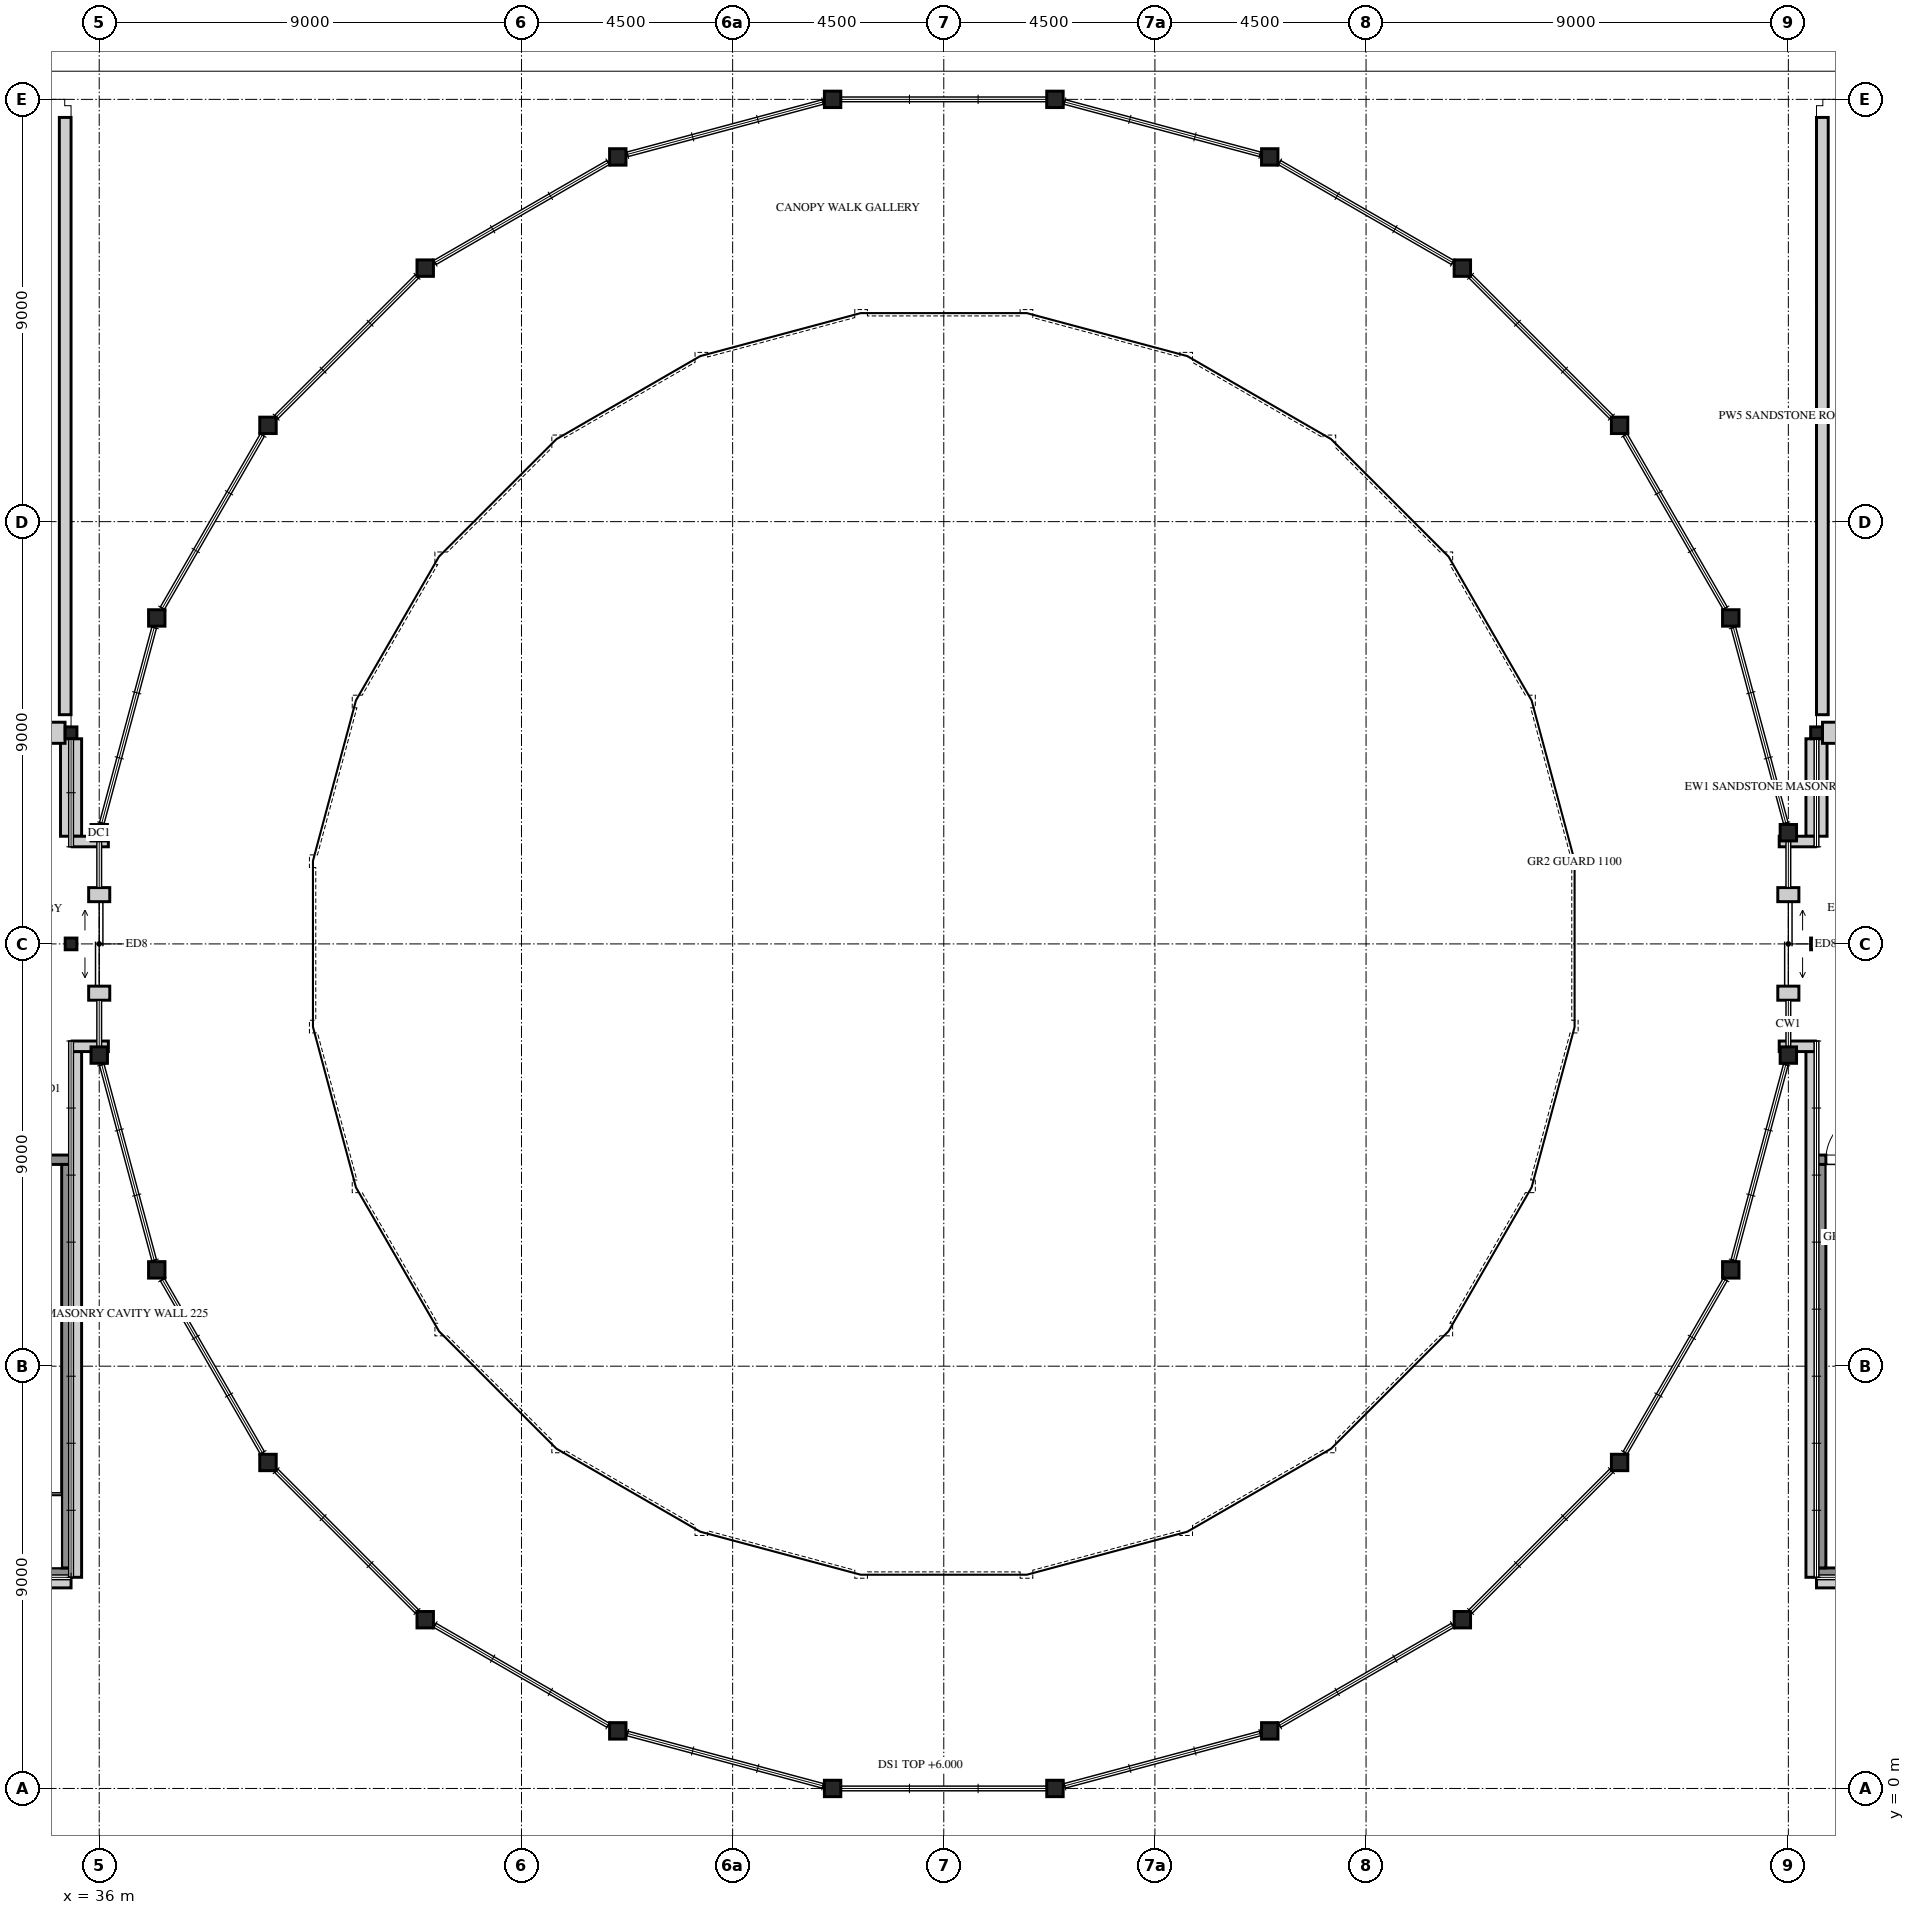
"""IFC4 building model, lengths in metres.
Left out: names, types, materials, properties, quantities, classifications, styles, units other than length and angle.
Written with IfcOpenShell. Run it as: python <this file> out.ifc"""

import sys

from ifc_helpers import new_model, si_unit, direction, frame, frame_2d, origin, origin_2d, place, context, subcontext, project, spatial, rectangle, hollow_rectangle, extrude, element, fill, save


model = new_model("IFC4")
c1 = context("Model", 3, precision=1e-05, world=origin(), true_north=direction((0.0, 1.0)))
c2 = subcontext(c1, "Body", "Model", "MODEL_VIEW")
j1 = project(units=[si_unit("LENGTHUNIT", "METRE"), si_unit("PLANEANGLEUNIT", "RADIAN")], contexts=[c1])
p1 = place(None, origin())
s1 = spatial("IfcSite", under=j1, at=p1, CompositionType="ELEMENT")
p2 = place(p1, origin())
s2 = spatial("IfcBuilding", under=s1, at=p2, CompositionType="ELEMENT")
p3 = place(p2, frame((0.0, 0.0, 6.0)))
s3 = spatial("IfcBuildingStorey", under=s2, at=p3, CompositionType="ELEMENT", Elevation=6.0)
for number, where, z_axis, x_axis in (
    (1, (72.0, 20.37, 0.0), (0.0, 0.0, 1.0), (1.0, 0.0, 0.0)),
    (2, (70.773, 24.948, 0.0), (0.0, 0.0, 1.0), (1.0, 0.0, 0.0)),
    (3, (68.404, 29.052, 0.0), (0.0, 0.0, 1.0), (1.0, 0.0, 0.0)),
    (4, (65.052, 32.404, 0.0), (0.0, 0.0, 1.0), (1.0, 0.0, 0.0)),
    (5, (60.948, 34.773, 0.0), (0.0, 0.0, 1.0), (1.0, 0.0, 0.0)),
    (6, (56.37, 36.0, 0.0), (0.0, 0.0, 1.0), (1.0, 0.0, 0.0)),
    (7, (51.63, 36.0, 0.0), (0.0, 0.0, 1.0), (1.0, 0.0, 0.0)),
    (8, (47.052, 34.773, 0.0), (0.0, 0.0, 1.0), (1.0, 0.0, 0.0)),
    (9, (42.948, 32.404, 0.0), (0.0, 0.0, 1.0), (1.0, 0.0, 0.0)),
    (10, (39.596, 29.052, 0.0), (0.0, 0.0, 1.0), (1.0, 0.0, 0.0)),
    (11, (37.227, 24.948, 0.0), (0.0, 0.0, 1.0), (1.0, 0.0, 0.0)),
    (12, (36.0, 20.37, 0.0), (0.0, 0.0, 1.0), (1.0, 0.0, 0.0)),
    (13, (36.0, 15.63, 0.0), (0.0, 0.0, 1.0), (1.0, 0.0, 0.0)),
    (14, (37.227, 11.052, 0.0), (0.0, 0.0, 1.0), (1.0, 0.0, 0.0)),
    (15, (39.596, 6.948, 0.0), (0.0, 0.0, 1.0), (1.0, 0.0, 0.0)),
    (16, (42.948, 3.596, 0.0), (0.0, 0.0, 1.0), (1.0, 0.0, 0.0)),
    (17, (47.052, 1.227, 0.0), (0.0, 0.0, 1.0), (1.0, 0.0, 0.0)),
    (18, (51.63, 0.0, 0.0), (0.0, 0.0, 1.0), (1.0, 0.0, 0.0)),
    (19, (56.37, 0.0, 0.0), (0.0, 0.0, 1.0), (1.0, 0.0, 0.0)),
    (20, (60.948, 1.227, 0.0), (0.0, 0.0, 1.0), (1.0, 0.0, 0.0)),
    (21, (65.052, 3.596, 0.0), (0.0, 0.0, 1.0), (1.0, 0.0, 0.0)),
    (22, (68.404, 6.948, 0.0), (0.0, 0.0, 1.0), (1.0, 0.0, 0.0)),
    (23, (70.773, 11.052, 0.0), (0.0, 0.0, 1.0), (1.0, 0.0, 0.0)),
    (24, (72.0, 15.63, 0.0), (0.0, 0.0, 1.0), (1.0, 0.0, 0.0)),
):
    element("IfcColumn", number, at=place(p3, frame(where, z_axis=z_axis, x_axis=x_axis)), inside=s3, PredefinedType="COLUMN", context=c2, shape_type="SweptSolid", body=[
        extrude(hollow_rectangle(XDim=0.35, YDim=0.35, WallThickness=0.012, InnerFilletRadius=0.019, OuterFilletRadius=0.031, at=origin_2d()), origin(), (0.0, 0.0, 1.0), 4.3),
    ])
for number, where, z_axis, x_axis in (
    (25, (31.5, 4.6, 0.0), (0.0, 0.0, 1.0), (1.0, 0.0, 0.0)),
    (26, (31.5, 13.4, 0.0), (0.0, 0.0, 1.0), (1.0, 0.0, 0.0)),
):
    element("IfcWall", number, at=place(p3, frame(where, z_axis=z_axis, x_axis=x_axis)), inside=s3, PredefinedType="SHEAR", context=c2, shape_type="SweptSolid", body=[
        extrude(rectangle(XDim=3.9, YDim=0.2, at=frame_2d((1.95, 0.0))), origin(), (0.0, 0.0, 1.0), 4.5),
    ])
p4 = place(p3, frame((35.3, 4.7, 0.0), z_axis=(0.0, 0.0, 1.0), x_axis=(0.0, 1.0, 0.0)))
e27 = element("IfcWall", 27, at=p4, inside=s3, PredefinedType="SHEAR", context=c2, shape_type="SweptSolid", body=[
    extrude(rectangle(XDim=8.6, YDim=0.2, at=frame_2d((4.3, 0.0))), origin(), (0.0, 0.0, 1.0), 4.5),
])
for number, where, z_axis, x_axis in (
    (28, (35.4, 18.0, 0.0), (0.0, 0.0, 1.0), (1.0, 0.0, 0.0)),
    (29, (35.4, 22.5, 0.0), (0.0, 0.0, 1.0), (1.0, 0.0, 0.0)),
):
    element("IfcColumn", number, at=place(p3, frame(where, z_axis=z_axis, x_axis=x_axis)), inside=s3, PredefinedType="COLUMN", context=c2, shape_type="SweptSolid", body=[
        extrude(hollow_rectangle(XDim=0.25, YDim=0.25, WallThickness=0.009, InnerFilletRadius=0.013, OuterFilletRadius=0.022, at=origin_2d()), origin(), (0.0, 0.0, 1.0), 4.046),
    ])
p5 = place(p3, frame((72.6, 4.6, 0.0), z_axis=(0.0, 0.0, 1.0), x_axis=(1.0, 0.0, 0.0)))
e30 = element("IfcWall", 30, at=p5, inside=s3, PredefinedType="SHEAR", context=c2, shape_type="SweptSolid", body=[
    extrude(rectangle(XDim=3.9, YDim=0.2, at=frame_2d((1.95, 0.0))), origin(), (0.0, 0.0, 1.0), 4.5),
])
p6 = place(p3, frame((72.6, 13.4, 0.0), z_axis=(0.0, 0.0, 1.0), x_axis=(1.0, 0.0, 0.0)))
e31 = element("IfcWall", 31, at=p6, inside=s3, PredefinedType="SHEAR", context=c2, shape_type="SweptSolid", body=[
    extrude(rectangle(XDim=3.9, YDim=0.2, at=frame_2d((1.95, 0.0))), origin(), (0.0, 0.0, 1.0), 4.5),
])
p7 = place(p6, frame((0.2, 0.0, 0.0)))
e32 = element("IfcOpeningElement", 32, at=p7, cuts=e31, PredefinedType="OPENING", context=c2, shape_type="SweptSolid", body=[
    extrude(rectangle(XDim=1.0, YDim=2.1, at=frame_2d((0.5, 1.05))), frame((0.0, 0.11, 0.0), z_axis=(0.0, -1.0, 0.0), x_axis=(1.0, 0.0, 0.0)), (0.0, 0.0, 1.0), 0.22),
])
p8 = place(p3, frame((72.7, 4.7, 0.0), z_axis=(0.0, 0.0, 1.0), x_axis=(0.0, 1.0, 0.0)))
e33 = element("IfcWall", 33, at=p8, inside=s3, PredefinedType="SHEAR", context=c2, shape_type="SweptSolid", body=[
    extrude(rectangle(XDim=8.6, YDim=0.2, at=frame_2d((4.3, 0.0))), origin(), (0.0, 0.0, 1.0), 4.5),
])
for number, where, z_axis, x_axis in (
    (34, (72.6, 18.0, 0.0), (0.0, 0.0, 1.0), (1.0, 0.0, 0.0)),
    (35, (72.6, 22.5, 0.0), (0.0, 0.0, 1.0), (1.0, 0.0, 0.0)),
):
    element("IfcColumn", number, at=place(p3, frame(where, z_axis=z_axis, x_axis=x_axis)), inside=s3, PredefinedType="COLUMN", context=c2, shape_type="SweptSolid", body=[
        extrude(hollow_rectangle(XDim=0.25, YDim=0.25, WallThickness=0.009, InnerFilletRadius=0.013, OuterFilletRadius=0.022, at=origin_2d()), origin(), (0.0, 0.0, 1.0), 4.046),
    ])
p9 = place(p3, frame((36.0, 16.8, 0.0), z_axis=(0.0, 0.0, 1.0), x_axis=(0.0, 1.0, 0.0)))
e36 = element("IfcWall", 36, at=p9, inside=s3, PredefinedType="STANDARD", context=c2, shape_type="SweptSolid", body=[
    extrude(rectangle(XDim=2.4, YDim=0.45, at=frame_2d((1.2, 0.0))), origin(), (0.0, 0.0, 1.0), 3.75),
])
p10 = place(p9, frame((0.3, 0.0, 0.012)))
e37 = element("IfcOpeningElement", 37, at=p10, cuts=e36, PredefinedType="OPENING", context=c2, shape_type="SweptSolid", body=[
    extrude(rectangle(XDim=1.8, YDim=2.4, at=frame_2d((0.9, 1.2))), frame((0.0, 0.235, 0.0), z_axis=(0.0, -1.0, 0.0), x_axis=(1.0, 0.0, 0.0)), (0.0, 0.0, 1.0), 0.47),
])
p11 = place(p3, frame((72.0, 19.2, 0.0), z_axis=(0.0, 0.0, 1.0), x_axis=(0.0, -1.0, 0.0)))
e38 = element("IfcWall", 38, at=p11, inside=s3, PredefinedType="STANDARD", context=c2, shape_type="SweptSolid", body=[
    extrude(rectangle(XDim=2.4, YDim=0.45, at=frame_2d((1.2, 0.0))), origin(), (0.0, 0.0, 1.0), 3.75),
])
p12 = place(p11, frame((0.3, 0.0, 0.012)))
e39 = element("IfcOpeningElement", 39, at=p12, cuts=e38, PredefinedType="OPENING", context=c2, shape_type="SweptSolid", body=[
    extrude(rectangle(XDim=1.8, YDim=2.4, at=frame_2d((0.9, 1.2))), frame((0.0, 0.235, 0.0), z_axis=(0.0, -1.0, 0.0), x_axis=(1.0, 0.0, 0.0)), (0.0, 0.0, 1.0), 0.47),
])
p13 = place(p3, frame((35.4, 4.387, 0.0), z_axis=(0.0, 0.0, 1.0), x_axis=(-1.0, 0.0, 0.0)))
e40 = element("IfcWall", 40, at=p13, inside=s3, PredefinedType="STANDARD", context=c2, shape_type="SweptSolid", body=[
    extrude(rectangle(XDim=3.9, YDim=0.225, at=frame_2d((1.95, 0.0))), origin(), (0.0, 0.0, 1.0), 0.9),
])
p14 = place(p3, frame((35.4, 22.372, 0.0), z_axis=(0.0, 0.0, 1.0), x_axis=(0.0, -1.0, 0.0)))
e41 = element("IfcWall", 41, at=p14, inside=s3, PredefinedType="STANDARD", context=c2, shape_type="SweptSolid", body=[
    extrude(rectangle(XDim=2.077, YDim=0.45, at=frame_2d((1.039, 0.0))), origin(), (0.0, 0.0, 1.0), 0.9),
])
p15 = place(p3, frame((35.512, 15.705, 0.0), z_axis=(0.0, 0.0, 1.0), x_axis=(0.0, -1.0, 0.0)))
e42 = element("IfcWall", 42, at=p15, inside=s3, PredefinedType="STANDARD", context=c2, shape_type="SweptSolid", body=[
    extrude(rectangle(XDim=11.205, YDim=0.225, at=frame_2d((5.603, 0.0))), origin(), (0.0, 0.0, 1.0), 0.9),
])
for number, where, z_axis, x_axis in (
    (43, (35.425, 20.182, 0.0), (0.0, 0.0, 1.0), (1.0, 0.0, 0.0)),
    (44, (35.425, 15.818, 0.0), (0.0, 0.0, 1.0), (1.0, 0.0, 0.0)),
):
    element("IfcWall", number, at=place(p3, frame(where, z_axis=z_axis, x_axis=x_axis)), inside=s3, PredefinedType="STANDARD", context=c2, shape_type="SweptSolid", body=[
        extrude(rectangle(XDim=0.77, YDim=0.225, at=frame_2d((0.385, 0.0))), origin(), (0.0, 0.0, 1.0), 3.74),
    ])
p16 = place(p3, frame((31.628, 22.5, 0.0), z_axis=(0.0, 0.0, 1.0), x_axis=(1.0, 0.0, 0.0)))
e45 = element("IfcWall", 45, at=p16, inside=s3, PredefinedType="STANDARD", context=c2, shape_type="SweptSolid", body=[
    extrude(rectangle(XDim=3.644, YDim=0.45, at=frame_2d((1.822, 0.0))), origin(), (0.0, 0.0, 1.0), 3.74),
])
p17 = place(p16, frame((0.922, 0.0, 0.0)))
e46 = element("IfcOpeningElement", 46, at=p17, cuts=e45, PredefinedType="OPENING", context=c2, shape_type="SweptSolid", body=[
    extrude(rectangle(XDim=1.8, YDim=2.1, at=frame_2d((0.9, 1.05))), frame((0.0, 0.235, 0.0), z_axis=(0.0, -1.0, 0.0), x_axis=(1.0, 0.0, 0.0)), (0.0, 0.0, 1.0), 0.47),
])
p18 = place(p3, frame((76.37, 4.387, 0.0), z_axis=(0.0, 0.0, 1.0), x_axis=(-1.0, 0.0, 0.0)))
e47 = element("IfcWall", 47, at=p18, inside=s3, PredefinedType="STANDARD", context=c2, shape_type="SweptSolid", body=[
    extrude(rectangle(XDim=3.77, YDim=0.225, at=frame_2d((1.885, 0.0))), origin(), (0.0, 0.0, 1.0), 0.9),
])
p19 = place(p3, frame((72.488, 4.5, 0.0), z_axis=(0.0, 0.0, 1.0), x_axis=(0.0, 1.0, 0.0)))
e48 = element("IfcWall", 48, at=p19, inside=s3, PredefinedType="STANDARD", context=c2, shape_type="SweptSolid", body=[
    extrude(rectangle(XDim=11.205, YDim=0.225, at=frame_2d((5.603, 0.0))), origin(), (0.0, 0.0, 1.0), 0.9),
])
p20 = place(p3, frame((72.6, 20.295, 0.0), z_axis=(0.0, 0.0, 1.0), x_axis=(0.0, 1.0, 0.0)))
e49 = element("IfcWall", 49, at=p20, inside=s3, PredefinedType="STANDARD", context=c2, shape_type="SweptSolid", body=[
    extrude(rectangle(XDim=2.077, YDim=0.45, at=frame_2d((1.039, 0.0))), origin(), (0.0, 0.0, 1.0), 0.9),
])
for number, where, z_axis, x_axis in (
    (50, (71.805, 15.818, 0.0), (0.0, 0.0, 1.0), (1.0, 0.0, 0.0)),
    (51, (71.805, 20.182, 0.0), (0.0, 0.0, 1.0), (1.0, 0.0, 0.0)),
):
    element("IfcWall", number, at=place(p3, frame(where, z_axis=z_axis, x_axis=x_axis)), inside=s3, PredefinedType="STANDARD", context=c2, shape_type="SweptSolid", body=[
        extrude(rectangle(XDim=0.77, YDim=0.225, at=frame_2d((0.385, 0.0))), origin(), (0.0, 0.0, 1.0), 3.74),
    ])
p21 = place(p3, frame((72.728, 22.5, 0.0), z_axis=(0.0, 0.0, 1.0), x_axis=(1.0, 0.0, 0.0)))
e52 = element("IfcWall", 52, at=p21, inside=s3, PredefinedType="STANDARD", context=c2, shape_type="SweptSolid", body=[
    extrude(rectangle(XDim=3.644, YDim=0.45, at=frame_2d((1.822, 0.0))), origin(), (0.0, 0.0, 1.0), 3.74),
])
p22 = place(p21, frame((0.922, 0.0, 0.0)))
e53 = element("IfcOpeningElement", 53, at=p22, cuts=e52, PredefinedType="OPENING", context=c2, shape_type="SweptSolid", body=[
    extrude(rectangle(XDim=1.8, YDim=2.1, at=frame_2d((0.9, 1.05))), frame((0.0, 0.235, 0.0), z_axis=(0.0, -1.0, 0.0), x_axis=(1.0, 0.0, 0.0)), (0.0, 0.0, 1.0), 0.47),
])
for number, where, z_axis, x_axis in (
    (54, (35.275, 35.615, 0.0), (0.0, 0.0, 1.0), (0.0, -1.0, 0.0)),
    (55, (72.725, 22.885, 0.0), (0.0, 0.0, 1.0), (0.0, 1.0, 0.0)),
):
    element("IfcWall", number, at=place(p3, frame(where, z_axis=z_axis, x_axis=x_axis)), inside=s3, PredefinedType="PARAPET", context=c2, shape_type="SweptSolid", body=[
        extrude(rectangle(XDim=12.73, YDim=0.25, at=frame_2d((6.365, 0.0))), origin(), (0.0, 0.0, 1.0), 1.1),
    ])
p23 = place(p10, origin())
e56 = element("IfcDoor", 56, at=p23, inside=s3, OperationType="DOUBLE_DOOR_SLIDING", PredefinedType="DOOR", context=c2, shape_type="SweptSolid", body=[
    extrude(rectangle(XDim=1.8, YDim=2.4, at=frame_2d((0.9, 1.2))), frame((0.0, 0.025, 0.0), z_axis=(0.0, -1.0, 0.0), x_axis=(1.0, 0.0, 0.0)), (0.0, 0.0, 1.0), 0.05),
])
fill(e37, e56)
p24 = place(p12, origin())
e57 = element("IfcDoor", 57, at=p24, inside=s3, OperationType="DOUBLE_DOOR_SLIDING", PredefinedType="DOOR", context=c2, shape_type="SweptSolid", body=[
    extrude(rectangle(XDim=1.8, YDim=2.4, at=frame_2d((0.9, 1.2))), frame((0.0, 0.025, 0.0), z_axis=(0.0, -1.0, 0.0), x_axis=(1.0, 0.0, 0.0)), (0.0, 0.0, 1.0), 0.05),
])
fill(e39, e57)
p25 = place(p7, frame((1.0, 0.0, 0.0), z_axis=(0.0, 0.0, 1.0), x_axis=(-1.0, 0.0, 0.0)))
e58 = element("IfcDoor", 58, at=p25, inside=s3, OperationType="SINGLE_SWING_RIGHT", PredefinedType="DOOR", context=c2, shape_type="SweptSolid", body=[
    extrude(rectangle(XDim=1.0, YDim=2.1, at=frame_2d((0.5, 1.05))), frame((0.0, 0.025, 0.0), z_axis=(0.0, -1.0, 0.0), x_axis=(1.0, 0.0, 0.0)), (0.0, 0.0, 1.0), 0.05),
])
fill(e32, e58)
save(model, sys.argv[1])
